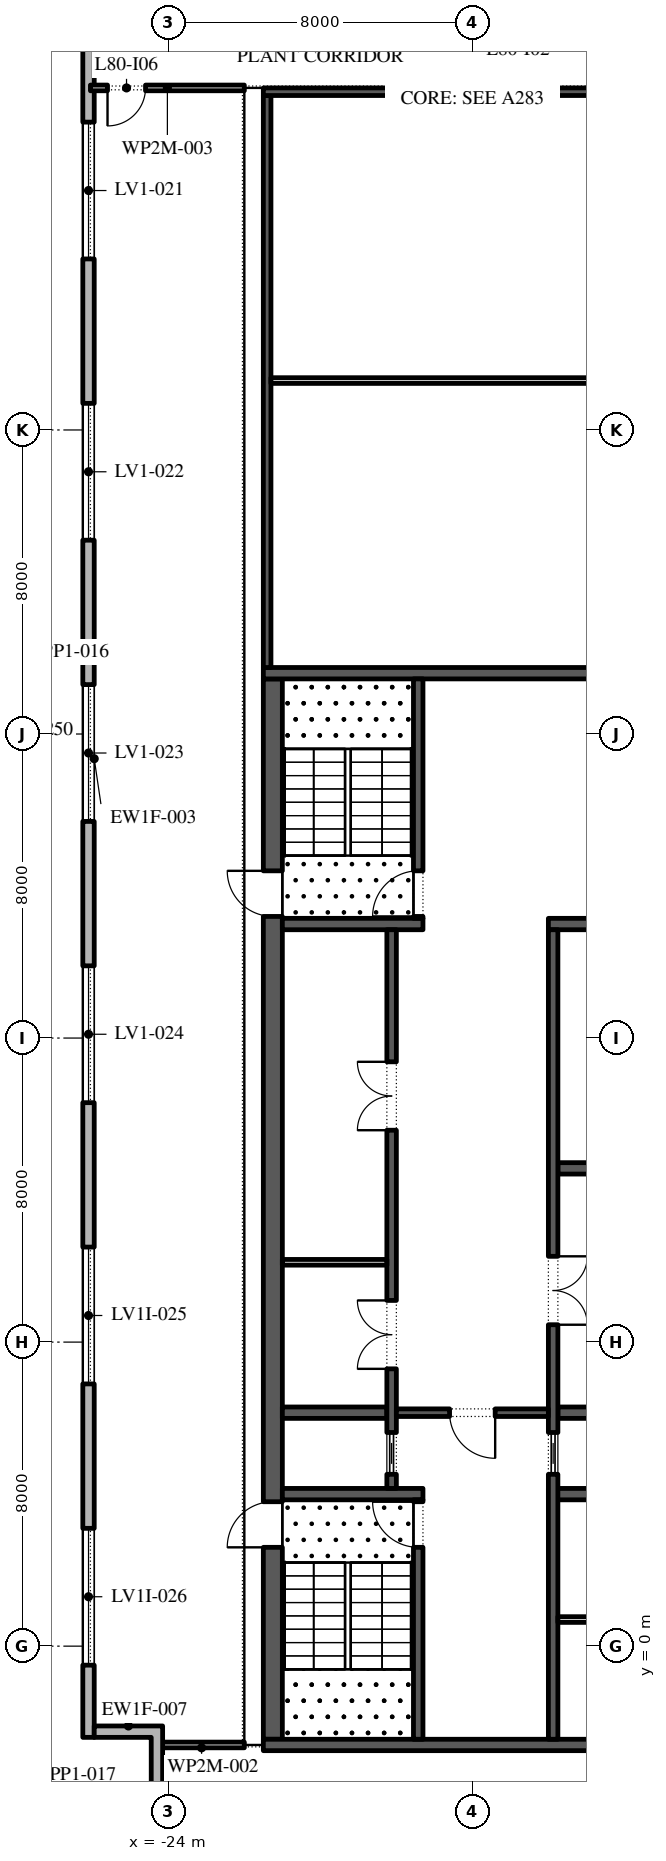
"""IFC4 building model, lengths in metres.
Left out: names, types, materials, properties, quantities, classifications, styles, units other than length and angle.
Written with IfcOpenShell. Run it as: python <this file> out.ifc"""

import sys

from ifc_helpers import new_model, si_unit, direction, frame, frame_2d, origin, place, context, subcontext, project, spatial, polyline, rectangle, outline, extrude, element, fill, save


model = new_model("IFC4")
c1 = context("Model", 3, precision=1e-05, world=origin(), true_north=direction((0.0, 1.0)))
c2 = subcontext(c1, "Body", "Model", "MODEL_VIEW")
j1 = project(units=[si_unit("LENGTHUNIT", "METRE"), si_unit("PLANEANGLEUNIT", "RADIAN")], contexts=[c1])
p1 = place(None, origin())
s1 = spatial("IfcSite", under=j1, at=p1, CompositionType="ELEMENT")
p2 = place(p1, origin())
s2 = spatial("IfcBuilding", under=s1, at=p2, CompositionType="ELEMENT")
p3 = place(p2, frame((0.0, 0.0, 363.6)))
s3 = spatial("IfcBuildingStorey", under=s2, at=p3, CompositionType="ELEMENT", Elevation=363.6)
p4 = place(p3, frame((-26.1, 49.1, 0.0), z_axis=(0.0, 0.0, 1.0), x_axis=(0.0, -1.0, 0.0)))
e1 = element("IfcWall", 1, at=p4, inside=s3, PredefinedType="STANDARD", context=c2, shape_type="SweptSolid", body=[
    extrude(rectangle(XDim=51.5, YDim=0.3, at=frame_2d((25.75, 0.0))), origin(), (0.0, 0.0, 1.0), 5.2),
])
p5 = place(p4, frame((1.75, 0.0, 0.6)))
e2 = element("IfcOpeningElement", 2, at=p5, cuts=e1, PredefinedType="OPENING", context=c2, shape_type="SweptSolid", body=[
    extrude(rectangle(XDim=3.6, YDim=4.15, at=frame_2d((1.8, 2.075))), frame((0.0, 0.16, 0.0), z_axis=(0.0, -1.0, 0.0), x_axis=(1.0, 0.0, 0.0)), (0.0, 0.0, 1.0), 0.32),
])
p6 = place(p4, frame((9.0, 0.0, 0.6)))
e3 = element("IfcOpeningElement", 3, at=p6, cuts=e1, PredefinedType="OPENING", context=c2, shape_type="SweptSolid", body=[
    extrude(rectangle(XDim=3.6, YDim=4.15, at=frame_2d((1.8, 2.075))), frame((0.0, 0.16, 0.0), z_axis=(0.0, -1.0, 0.0), x_axis=(1.0, 0.0, 0.0)), (0.0, 0.0, 1.0), 0.32),
])
p7 = place(p4, frame((16.4, 0.0, 0.6)))
e4 = element("IfcOpeningElement", 4, at=p7, cuts=e1, PredefinedType="OPENING", context=c2, shape_type="SweptSolid", body=[
    extrude(rectangle(XDim=3.6, YDim=4.15, at=frame_2d((1.8, 2.075))), frame((0.0, 0.16, 0.0), z_axis=(0.0, -1.0, 0.0), x_axis=(1.0, 0.0, 0.0)), (0.0, 0.0, 1.0), 0.32),
])
p8 = place(p4, frame((23.8, 0.0, 0.6)))
e5 = element("IfcOpeningElement", 5, at=p8, cuts=e1, PredefinedType="OPENING", context=c2, shape_type="SweptSolid", body=[
    extrude(rectangle(XDim=3.6, YDim=4.15, at=frame_2d((1.8, 2.075))), frame((0.0, 0.16, 0.0), z_axis=(0.0, -1.0, 0.0), x_axis=(1.0, 0.0, 0.0)), (0.0, 0.0, 1.0), 0.32),
])
p9 = place(p4, frame((31.2, 0.0, 0.6)))
e6 = element("IfcOpeningElement", 6, at=p9, cuts=e1, PredefinedType="OPENING", context=c2, shape_type="SweptSolid", body=[
    extrude(rectangle(XDim=3.6, YDim=4.15, at=frame_2d((1.8, 2.075))), frame((0.0, 0.16, 0.0), z_axis=(0.0, -1.0, 0.0), x_axis=(1.0, 0.0, 0.0)), (0.0, 0.0, 1.0), 0.32),
])
p10 = place(p4, frame((38.6, 0.0, 0.6)))
e7 = element("IfcOpeningElement", 7, at=p10, cuts=e1, PredefinedType="OPENING", context=c2, shape_type="SweptSolid", body=[
    extrude(rectangle(XDim=3.6, YDim=4.1, at=frame_2d((1.8, 2.05))), frame((0.0, 0.16, 0.0), z_axis=(0.0, -1.0, 0.0), x_axis=(1.0, 0.0, 0.0)), (0.0, 0.0, 1.0), 0.32),
])
p11 = place(p4, frame((46.0, 0.0, 0.6)))
e8 = element("IfcOpeningElement", 8, at=p11, cuts=e1, PredefinedType="OPENING", context=c2, shape_type="SweptSolid", body=[
    extrude(rectangle(XDim=3.6, YDim=4.1, at=frame_2d((1.8, 2.05))), frame((0.0, 0.16, 0.0), z_axis=(0.0, -1.0, 0.0), x_axis=(1.0, 0.0, 0.0)), (0.0, 0.0, 1.0), 0.32),
])
p12 = place(p3, origin())
e9 = element("IfcWall", 9, at=p12, inside=s3, PredefinedType="STANDARD", context=c2, shape_type="SweptSolid", body=[
    extrude(outline(polyline([(-22.65, -4.2), (-24.45, -4.2), (-24.45, -2.4), (-25.95, -2.4), (-25.95, -2.1), (-24.15, -2.1), (-24.15, -3.9), (-22.35, -3.9), (-22.35, -6.0), (-22.65, -6.0), (-22.65, -4.2)])), origin(), (0.0, 0.0, 1.0), 5.2),
])
p13 = place(p3, frame((-21.25, -2.45, 0.0), z_axis=(0.0, 0.0, 1.0), x_axis=(0.0, 1.0, 0.0)))
e10 = element("IfcWall", 10, at=p13, inside=s3, PredefinedType="SHEAR", context=c2, shape_type="SweptSolid", body=[
    extrude(rectangle(XDim=27.9, YDim=0.5, at=frame_2d((13.95, 0.0))), origin(), (0.0, 0.0, 1.0), 5.2),
])
p14 = place(p13, frame((5.05, 0.0, 0.0)))
e11 = element("IfcOpeningElement", 11, at=p14, cuts=e10, PredefinedType="OPENING", context=c2, shape_type="SweptSolid", body=[
    extrude(rectangle(XDim=1.2, YDim=2.1, at=frame_2d((0.6, 1.05))), frame((0.0, 0.26, 0.0), z_axis=(0.0, -1.0, 0.0), x_axis=(1.0, 0.0, 0.0)), (0.0, 0.0, 1.0), 0.52),
])
p15 = place(p13, frame((21.65, 0.0, 0.0)))
e12 = element("IfcOpeningElement", 12, at=p15, cuts=e10, PredefinedType="OPENING", context=c2, shape_type="SweptSolid", body=[
    extrude(rectangle(XDim=1.2, YDim=2.1, at=frame_2d((0.6, 1.05))), frame((0.0, 0.26, 0.0), z_axis=(0.0, -1.0, 0.0), x_axis=(1.0, 0.0, 0.0)), (0.0, 0.0, 1.0), 0.52),
])
for number, where, z_axis, x_axis in (
    (13, (-21.5, -2.6, 0.0), (0.0, 0.0, 1.0), (1.0, 0.0, 0.0)),
    (14, (-21.5, 25.6, 0.0), (0.0, 0.0, 1.0), (1.0, 0.0, 0.0)),
):
    element("IfcWall", number, at=place(p3, frame(where, z_axis=z_axis, x_axis=x_axis)), inside=s3, PredefinedType="SHEAR", context=c2, shape_type="SweptSolid", body=[
        extrude(rectangle(XDim=11.0, YDim=0.3, at=frame_2d((5.5, 0.0))), origin(), (0.0, 0.0, 1.0), 5.2),
    ])
p16 = place(p3, frame((-21.0, 4.0, 0.0), z_axis=(0.0, 0.0, 1.0), x_axis=(1.0, 0.0, 0.0)))
e15 = element("IfcWall", 15, at=p16, inside=s3, PredefinedType="SHEAR", context=c2, shape_type="SweptSolid", body=[
    extrude(rectangle(XDim=3.7, YDim=0.3, at=frame_2d((1.85, 0.0))), origin(), (0.0, 0.0, 1.0), 5.2),
])
p17 = place(p3, frame((-17.425, -2.45, 0.0), z_axis=(0.0, 0.0, 1.0), x_axis=(0.0, 1.0, 0.0)))
e16 = element("IfcWall", 16, at=p17, inside=s3, PredefinedType="SHEAR", context=c2, shape_type="SweptSolid", body=[
    extrude(rectangle(XDim=6.3, YDim=0.25, at=frame_2d((3.15, 0.0))), origin(), (0.0, 0.0, 1.0), 5.2),
])
p18 = place(p17, frame((5.05, 0.0, 0.0)))
e17 = element("IfcOpeningElement", 17, at=p18, cuts=e16, PredefinedType="OPENING", context=c2, shape_type="SweptSolid", body=[
    extrude(rectangle(XDim=1.2, YDim=2.1, at=frame_2d((0.6, 1.05))), frame((0.0, 0.135, 0.0), z_axis=(0.0, -1.0, 0.0), x_axis=(1.0, 0.0, 0.0)), (0.0, 0.0, 1.0), 0.27),
])
p19 = place(p3, frame((-21.0, 19.0, 0.0), z_axis=(0.0, 0.0, 1.0), x_axis=(1.0, 0.0, 0.0)))
e18 = element("IfcWall", 18, at=p19, inside=s3, PredefinedType="SHEAR", context=c2, shape_type="SweptSolid", body=[
    extrude(rectangle(XDim=3.7, YDim=0.3, at=frame_2d((1.85, 0.0))), origin(), (0.0, 0.0, 1.0), 5.2),
])
p20 = place(p3, frame((-17.425, 19.15, 0.0), z_axis=(0.0, 0.0, 1.0), x_axis=(0.0, 1.0, 0.0)))
e19 = element("IfcWall", 19, at=p20, inside=s3, PredefinedType="SHEAR", context=c2, shape_type="SweptSolid", body=[
    extrude(rectangle(XDim=6.3, YDim=0.25, at=frame_2d((3.15, 0.0))), origin(), (0.0, 0.0, 1.0), 5.2),
])
p21 = place(p20, frame((0.05, 0.0, 0.0)))
e20 = element("IfcOpeningElement", 20, at=p21, cuts=e19, PredefinedType="OPENING", context=c2, shape_type="SweptSolid", body=[
    extrude(rectangle(XDim=1.2, YDim=2.1, at=frame_2d((0.6, 1.05))), frame((0.0, 0.135, 0.0), z_axis=(0.0, -1.0, 0.0), x_axis=(1.0, 0.0, 0.0)), (0.0, 0.0, 1.0), 0.27),
])
p22 = place(p3, frame((-21.0, 6.143, 0.0), z_axis=(0.0, 0.0, 1.0), x_axis=(1.0, 0.0, 0.0)))
e21 = element("IfcWall", 21, at=p22, inside=s3, PredefinedType="SHEAR", context=c2, shape_type="SweptSolid", body=[
    extrude(rectangle(XDim=2.75, YDim=0.3, at=frame_2d((1.375, 0.0))), origin(), (0.0, 0.0, 1.0), 5.2),
])
p23 = place(p3, frame((-18.125, 4.15, 0.0), z_axis=(0.0, 0.0, 1.0), x_axis=(0.0, 1.0, 0.0)))
e22 = element("IfcWall", 22, at=p23, inside=s3, PredefinedType="SHEAR", context=c2, shape_type="SweptSolid", body=[
    extrude(rectangle(XDim=14.7, YDim=0.25, at=frame_2d((7.35, 0.0))), origin(), (0.0, 0.0, 1.0), 5.2),
])
p24 = place(p23, frame((3.146, 0.0, 0.0)))
e23 = element("IfcOpeningElement", 23, at=p24, cuts=e22, PredefinedType="OPENING", context=c2, shape_type="SweptSolid", body=[
    extrude(rectangle(XDim=1.8, YDim=2.4, at=frame_2d((0.9, 1.2))), frame((0.0, 0.135, 0.0), z_axis=(0.0, -1.0, 0.0), x_axis=(1.0, 0.0, 0.0)), (0.0, 0.0, 1.0), 0.27),
])
p25 = place(p23, frame((9.425, 0.0, 0.0)))
e24 = element("IfcOpeningElement", 24, at=p25, cuts=e22, PredefinedType="OPENING", context=c2, shape_type="SweptSolid", body=[
    extrude(rectangle(XDim=1.8, YDim=2.4, at=frame_2d((0.9, 1.2))), frame((0.0, 0.135, 0.0), z_axis=(0.0, -1.0, 0.0), x_axis=(1.0, 0.0, 0.0)), (0.0, 0.0, 1.0), 0.27),
])
p26 = place(p23, frame((0.371, 0.0, 0.0)))
e25 = element("IfcOpeningElement", 25, at=p26, cuts=e22, PredefinedType="OPENING", context=c2, shape_type="SweptSolid", body=[
    extrude(rectangle(XDim=1.1, YDim=2.1, at=frame_2d((0.55, 1.05))), frame((0.0, 0.135, 0.0), z_axis=(0.0, -1.0, 0.0), x_axis=(1.0, 0.0, 0.0)), (0.0, 0.0, 1.0), 0.27),
])
p27 = place(p3, frame((-21.0, 10.1, 0.0), z_axis=(0.0, 0.0, 1.0), x_axis=(1.0, 0.0, 0.0)))
e26 = element("IfcWall", 26, at=p27, inside=s3, PredefinedType="PARTITIONING", context=c2, shape_type="SweptSolid", body=[
    extrude(rectangle(XDim=2.75, YDim=0.15, at=frame_2d((1.375, 0.0))), origin(), (0.0, 0.0, 1.0), 5.2),
])
p28 = place(p3, frame((-14.0, 4.0, 0.0), z_axis=(0.0, 0.0, 1.0), x_axis=(1.0, 0.0, 0.0)))
e27 = element("IfcWall", 27, at=p28, inside=s3, PredefinedType="SHEAR", context=c2, shape_type="SweptSolid", body=[
    extrude(rectangle(XDim=3.0, YDim=0.3, at=frame_2d((1.5, 0.0))), origin(), (0.0, 0.0, 1.0), 5.2),
])
for number, where, z_axis, x_axis in (
    (28, (-13.75, 6.143, 0.0), (0.0, 0.0, 1.0), (1.0, 0.0, 0.0)),
    (29, (-13.75, 12.571, 0.0), (0.0, 0.0, 1.0), (1.0, 0.0, 0.0)),
):
    element("IfcWall", number, at=place(p3, frame(where, z_axis=z_axis, x_axis=x_axis)), inside=s3, PredefinedType="SHEAR", context=c2, shape_type="SweptSolid", body=[
        extrude(rectangle(XDim=2.75, YDim=0.3, at=frame_2d((1.375, 0.0))), origin(), (0.0, 0.0, 1.0), 5.2),
    ])
p29 = place(p3, frame((-14.0, 19.0, 0.0), z_axis=(0.0, 0.0, 1.0), x_axis=(1.0, 0.0, 0.0)))
e30 = element("IfcWall", 30, at=p29, inside=s3, PredefinedType="SHEAR", context=c2, shape_type="SweptSolid", body=[
    extrude(rectangle(XDim=3.0, YDim=0.3, at=frame_2d((1.5, 0.0))), origin(), (0.0, 0.0, 1.0), 5.2),
])
p30 = place(p3, frame((-13.875, -2.45, 0.0), z_axis=(0.0, 0.0, 1.0), x_axis=(0.0, 1.0, 0.0)))
e31 = element("IfcWall", 31, at=p30, inside=s3, PredefinedType="SHEAR", context=c2, shape_type="SweptSolid", body=[
    extrude(rectangle(XDim=21.3, YDim=0.25, at=frame_2d((10.65, 0.0))), origin(), (0.0, 0.0, 1.0), 5.2),
])
p31 = place(p30, frame((10.907, 0.0, 0.0)))
e32 = element("IfcOpeningElement", 32, at=p31, cuts=e31, PredefinedType="OPENING", context=c2, shape_type="SweptSolid", body=[
    extrude(rectangle(XDim=1.8, YDim=2.4, at=frame_2d((0.9, 1.2))), frame((0.0, 0.135, 0.0), z_axis=(0.0, -1.0, 0.0), x_axis=(1.0, 0.0, 0.0)), (0.0, 0.0, 1.0), 0.27),
])
p32 = place(p30, frame((6.971, 0.0, 0.0)))
e33 = element("IfcOpeningElement", 33, at=p32, cuts=e31, PredefinedType="OPENING", context=c2, shape_type="SweptSolid", body=[
    extrude(rectangle(XDim=1.1, YDim=2.1, at=frame_2d((0.55, 1.05))), frame((0.0, 0.135, 0.0), z_axis=(0.0, -1.0, 0.0), x_axis=(1.0, 0.0, 0.0)), (0.0, 0.0, 1.0), 0.27),
])
p33 = place(p3, frame((-18.0, 6.143, 0.0), z_axis=(0.0, 0.0, 1.0), x_axis=(1.0, 0.0, 0.0)))
e34 = element("IfcWall", 34, at=p33, inside=s3, PredefinedType="SHEAR", context=c2, shape_type="SweptSolid", body=[
    extrude(rectangle(XDim=4.0, YDim=0.2, at=frame_2d((2.0, 0.0))), origin(), (0.0, 0.0, 1.0), 5.2),
])
p34 = place(p33, frame((1.4, 0.0, 0.0)))
e35 = element("IfcOpeningElement", 35, at=p34, cuts=e34, PredefinedType="OPENING", context=c2, shape_type="SweptSolid", body=[
    extrude(rectangle(XDim=1.2, YDim=2.1, at=frame_2d((0.6, 1.05))), frame((0.0, 0.11, 0.0), z_axis=(0.0, -1.0, 0.0), x_axis=(1.0, 0.0, 0.0)), (0.0, 0.0, 1.0), 0.22),
])
p35 = place(p3, frame((-13.75, 0.7, 0.0), z_axis=(0.0, 0.0, 1.0), x_axis=(1.0, 0.0, 0.0)))
e36 = element("IfcWall", 36, at=p35, inside=s3, PredefinedType="PARTITIONING", context=c2, shape_type="SweptSolid", body=[
    extrude(rectangle(XDim=2.75, YDim=0.15, at=frame_2d((1.375, 0.0))), origin(), (0.0, 0.0, 1.0), 5.2),
])
p36 = place(p3, frame((-21.4, 25.75, 0.0), z_axis=(0.0, 0.0, 1.0), x_axis=(0.0, 1.0, 0.0)))
e37 = element("IfcWall", 37, at=p36, inside=s3, PredefinedType="SHEAR", context=c2, shape_type="SweptSolid", body=[
    extrude(rectangle(XDim=15.05, YDim=0.2, at=frame_2d((7.525, 0.0))), origin(), (0.0, 0.0, 1.0), 5.2),
])
p37 = place(p3, frame((-21.5, 40.9, 0.0), z_axis=(0.0, 0.0, 1.0), x_axis=(1.0, 0.0, 0.0)))
e38 = element("IfcWall", 38, at=p37, inside=s3, PredefinedType="SHEAR", context=c2, shape_type="SweptSolid", body=[
    extrude(rectangle(XDim=11.0, YDim=0.2, at=frame_2d((5.5, 0.0))), origin(), (0.0, 0.0, 1.0), 5.2),
])
p38 = place(p3, frame((-21.3, 33.3, 0.0), z_axis=(0.0, 0.0, 1.0), x_axis=(1.0, 0.0, 0.0)))
e39 = element("IfcWall", 39, at=p38, inside=s3, PredefinedType="PARTITIONING", context=c2, shape_type="SweptSolid", body=[
    extrude(rectangle(XDim=10.6, YDim=0.15, at=frame_2d((5.3, 0.0))), origin(), (0.0, 0.0, 1.0), 5.2),
])
p39 = place(p3, frame((-24.25, -2.6, 0.0), z_axis=(0.0, 0.0, 1.0), x_axis=(1.0, 0.0, 0.0)))
e40 = element("IfcWall", 40, at=p39, inside=s3, PredefinedType="PARTITIONING", context=c2, shape_type="SweptSolid", body=[
    extrude(rectangle(XDim=2.25, YDim=0.15, at=frame_2d((1.125, 0.0))), origin(), (0.0, 0.0, 1.0), 5.2),
])
p40 = place(p3, frame((-22.0, 41.0, 0.0), z_axis=(0.0, 0.0, 1.0), x_axis=(-1.0, 0.0, 0.0)))
e41 = element("IfcWall", 41, at=p40, inside=s3, PredefinedType="PARTITIONING", context=c2, shape_type="SweptSolid", body=[
    extrude(rectangle(XDim=4.05, YDim=0.15, at=frame_2d((2.025, 0.0))), origin(), (0.0, 0.0, 1.0), 5.2),
])
p41 = place(p40, frame((2.6, 0.0, 0.0)))
e42 = element("IfcOpeningElement", 42, at=p41, cuts=e41, PredefinedType="OPENING", context=c2, shape_type="SweptSolid", body=[
    extrude(rectangle(XDim=1.0, YDim=2.1, at=frame_2d((0.5, 1.05))), frame((0.0, 0.085, 0.0), z_axis=(0.0, -1.0, 0.0), x_axis=(1.0, 0.0, 0.0)), (0.0, 0.0, 1.0), 0.17),
])
p42 = place(p6, origin())
e43 = element("IfcWindow", 43, at=p42, inside=s3, PartitioningType="DOUBLE_PANEL_HORIZONTAL", PredefinedType="WINDOW", context=c2, shape_type="SweptSolid", body=[
    extrude(rectangle(XDim=3.6, YDim=4.15, at=frame_2d((1.8, 2.075))), frame((0.0, 0.03, 0.0), z_axis=(0.0, -1.0, 0.0), x_axis=(1.0, 0.0, 0.0)), (0.0, 0.0, 1.0), 0.06),
])
fill(e3, e43)
p43 = place(p7, origin())
e44 = element("IfcWindow", 44, at=p43, inside=s3, PartitioningType="DOUBLE_PANEL_HORIZONTAL", PredefinedType="WINDOW", context=c2, shape_type="SweptSolid", body=[
    extrude(rectangle(XDim=3.6, YDim=4.15, at=frame_2d((1.8, 2.075))), frame((0.0, 0.03, 0.0), z_axis=(0.0, -1.0, 0.0), x_axis=(1.0, 0.0, 0.0)), (0.0, 0.0, 1.0), 0.06),
])
fill(e4, e44)
p44 = place(p8, origin())
e45 = element("IfcWindow", 45, at=p44, inside=s3, PartitioningType="DOUBLE_PANEL_HORIZONTAL", PredefinedType="WINDOW", context=c2, shape_type="SweptSolid", body=[
    extrude(rectangle(XDim=3.6, YDim=4.15, at=frame_2d((1.8, 2.075))), frame((0.0, 0.03, 0.0), z_axis=(0.0, -1.0, 0.0), x_axis=(1.0, 0.0, 0.0)), (0.0, 0.0, 1.0), 0.06),
])
fill(e5, e45)
p45 = place(p9, origin())
e46 = element("IfcWindow", 46, at=p45, inside=s3, PartitioningType="DOUBLE_PANEL_HORIZONTAL", PredefinedType="WINDOW", context=c2, shape_type="SweptSolid", body=[
    extrude(rectangle(XDim=3.6, YDim=4.15, at=frame_2d((1.8, 2.075))), frame((0.0, 0.03, 0.0), z_axis=(0.0, -1.0, 0.0), x_axis=(1.0, 0.0, 0.0)), (0.0, 0.0, 1.0), 0.06),
])
fill(e6, e46)
p46 = place(p10, origin())
e47 = element("IfcWindow", 47, at=p46, inside=s3, PartitioningType="DOUBLE_PANEL_HORIZONTAL", PredefinedType="WINDOW", context=c2, shape_type="SweptSolid", body=[
    extrude(rectangle(XDim=3.6, YDim=4.1, at=frame_2d((1.8, 2.05))), frame((0.0, 0.03, 0.0), z_axis=(0.0, -1.0, 0.0), x_axis=(1.0, 0.0, 0.0)), (0.0, 0.0, 1.0), 0.06),
])
fill(e7, e47)
p47 = place(p11, origin())
e48 = element("IfcWindow", 48, at=p47, inside=s3, PartitioningType="DOUBLE_PANEL_HORIZONTAL", PredefinedType="WINDOW", context=c2, shape_type="SweptSolid", body=[
    extrude(rectangle(XDim=3.6, YDim=4.1, at=frame_2d((1.8, 2.05))), frame((0.0, 0.03, 0.0), z_axis=(0.0, -1.0, 0.0), x_axis=(1.0, 0.0, 0.0)), (0.0, 0.0, 1.0), 0.06),
])
fill(e8, e48)
p48 = place(p24, origin())
e49 = element("IfcDoor", 49, at=p48, inside=s3, OperationType="DOUBLE_DOOR_SINGLE_SWING", PredefinedType="DOOR", context=c2, shape_type="SweptSolid", body=[
    extrude(rectangle(XDim=1.8, YDim=2.4, at=frame_2d((0.9, 1.2))), frame((0.0, 0.125, 0.0), z_axis=(0.0, -1.0, 0.0), x_axis=(1.0, 0.0, 0.0)), (0.0, 0.0, 1.0), 0.05),
])
fill(e23, e49)
p49 = place(p25, origin())
e50 = element("IfcDoor", 50, at=p49, inside=s3, OperationType="DOUBLE_DOOR_SINGLE_SWING", PredefinedType="DOOR", context=c2, shape_type="SweptSolid", body=[
    extrude(rectangle(XDim=1.8, YDim=2.4, at=frame_2d((0.9, 1.2))), frame((0.0, 0.125, 0.0), z_axis=(0.0, -1.0, 0.0), x_axis=(1.0, 0.0, 0.0)), (0.0, 0.0, 1.0), 0.05),
])
fill(e24, e50)
p50 = place(p26, origin())
e51 = element("IfcDoor", 51, at=p50, inside=s3, OperationType="SLIDING_TO_LEFT", PredefinedType="DOOR", context=c2, shape_type="SweptSolid", body=[
    extrude(rectangle(XDim=1.1, YDim=2.1, at=frame_2d((0.55, 1.05))), frame((0.0, 0.025, 0.0), z_axis=(0.0, -1.0, 0.0), x_axis=(1.0, 0.0, 0.0)), (0.0, 0.0, 1.0), 0.05),
])
fill(e25, e51)
p51 = place(p31, frame((1.8, -0.2, 0.0), z_axis=(0.0, 0.0, 1.0), x_axis=(-1.0, 0.0, 0.0)))
e52 = element("IfcDoor", 52, at=p51, inside=s3, OperationType="DOUBLE_DOOR_SINGLE_SWING", PredefinedType="DOOR", context=c2, shape_type="SweptSolid", body=[
    extrude(rectangle(XDim=1.8, YDim=2.4, at=frame_2d((0.9, 1.2))), frame((0.0, -0.075, 0.0), z_axis=(0.0, -1.0, 0.0), x_axis=(1.0, 0.0, 0.0)), (0.0, 0.0, 1.0), 0.05),
])
fill(e32, e52)
p52 = place(p32, origin())
e53 = element("IfcDoor", 53, at=p52, inside=s3, OperationType="SLIDING_TO_LEFT", PredefinedType="DOOR", context=c2, shape_type="SweptSolid", body=[
    extrude(rectangle(XDim=1.1, YDim=2.1, at=frame_2d((0.55, 1.05))), frame((0.0, 0.025, 0.0), z_axis=(0.0, -1.0, 0.0), x_axis=(1.0, 0.0, 0.0)), (0.0, 0.0, 1.0), 0.05),
])
fill(e33, e53)
p53 = place(p34, frame((1.2, 0.0, 0.0), z_axis=(0.0, 0.0, 1.0), x_axis=(-1.0, 0.0, 0.0)))
e54 = element("IfcDoor", 54, at=p53, inside=s3, OperationType="SINGLE_SWING_RIGHT", PredefinedType="DOOR", context=c2, shape_type="SweptSolid", body=[
    extrude(rectangle(XDim=1.2, YDim=2.1, at=frame_2d((0.6, 1.05))), frame((0.0, 0.025, 0.0), z_axis=(0.0, -1.0, 0.0), x_axis=(1.0, 0.0, 0.0)), (0.0, 0.0, 1.0), 0.05),
])
fill(e35, e54)
p54 = place(p18, origin())
e55 = element("IfcDoor", 55, at=p54, inside=s3, OperationType="SINGLE_SWING_LEFT", PredefinedType="DOOR", context=c2, shape_type="SweptSolid", body=[
    extrude(rectangle(XDim=1.2, YDim=2.1, at=frame_2d((0.6, 1.05))), frame((0.0, 0.025, 0.0), z_axis=(0.0, -1.0, 0.0), x_axis=(1.0, 0.0, 0.0)), (0.0, 0.0, 1.0), 0.05),
])
fill(e17, e55)
p55 = place(p14, origin())
e56 = element("IfcDoor", 56, at=p55, inside=s3, OperationType="SINGLE_SWING_RIGHT", PredefinedType="DOOR", context=c2, shape_type="SweptSolid", body=[
    extrude(rectangle(XDim=1.2, YDim=2.1, at=frame_2d((0.6, 1.05))), frame((0.0, 0.025, 0.0), z_axis=(0.0, -1.0, 0.0), x_axis=(1.0, 0.0, 0.0)), (0.0, 0.0, 1.0), 0.05),
])
fill(e11, e56)
p56 = place(p21, origin())
e57 = element("IfcDoor", 57, at=p56, inside=s3, OperationType="SINGLE_SWING_RIGHT", PredefinedType="DOOR", context=c2, shape_type="SweptSolid", body=[
    extrude(rectangle(XDim=1.2, YDim=2.1, at=frame_2d((0.6, 1.05))), frame((0.0, 0.025, 0.0), z_axis=(0.0, -1.0, 0.0), x_axis=(1.0, 0.0, 0.0)), (0.0, 0.0, 1.0), 0.05),
])
fill(e20, e57)
p57 = place(p15, origin())
e58 = element("IfcDoor", 58, at=p57, inside=s3, OperationType="SINGLE_SWING_LEFT", PredefinedType="DOOR", context=c2, shape_type="SweptSolid", body=[
    extrude(rectangle(XDim=1.2, YDim=2.1, at=frame_2d((0.6, 1.05))), frame((0.0, 0.025, 0.0), z_axis=(0.0, -1.0, 0.0), x_axis=(1.0, 0.0, 0.0)), (0.0, 0.0, 1.0), 0.05),
])
fill(e12, e58)
p58 = place(p41, origin())
e59 = element("IfcDoor", 59, at=p58, inside=s3, OperationType="SINGLE_SWING_LEFT", PredefinedType="DOOR", context=c2, shape_type="SweptSolid", body=[
    extrude(rectangle(XDim=1.0, YDim=2.1, at=frame_2d((0.5, 1.05))), frame((0.0, 0.025, 0.0), z_axis=(0.0, -1.0, 0.0), x_axis=(1.0, 0.0, 0.0)), (0.0, 0.0, 1.0), 0.05),
])
fill(e42, e59)
save(model, sys.argv[1])
